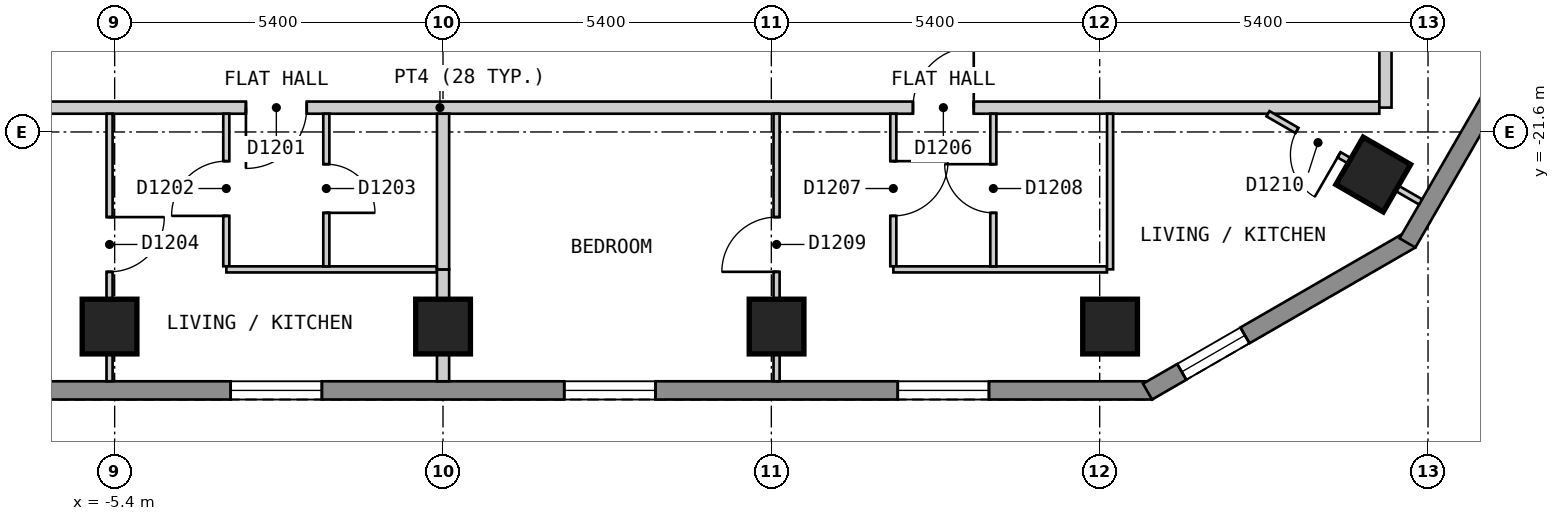
"""IFC4 building model, lengths in metres.
Left out: names, types, materials, properties, quantities, classifications, styles, units other than length and angle.
Written with IfcOpenShell. Run it as: python <this file> out.ifc"""

import sys

from ifc_helpers import new_model, si_unit, direction, frame, frame_2d, origin, origin_2d, place, context, subcontext, project, spatial, polyline, rectangle, outline, extrude, element, fill, save


model = new_model("IFC4")
c1 = context("Model", 3, precision=1e-05, world=origin(), true_north=direction((0.0, 1.0)))
c2 = subcontext(c1, "Body", "Model", "MODEL_VIEW")
j1 = project(units=[si_unit("LENGTHUNIT", "METRE"), si_unit("PLANEANGLEUNIT", "RADIAN")], contexts=[c1])
p1 = place(None, origin())
s1 = spatial("IfcSite", under=j1, at=p1, CompositionType="ELEMENT")
p2 = place(p1, origin())
s2 = spatial("IfcBuilding", under=s1, at=p2, CompositionType="ELEMENT")
p3 = place(p2, frame((0.0, 0.0, 129.6)))
s3 = spatial("IfcBuildingStorey", under=s2, at=p3, CompositionType="ELEMENT", Elevation=129.6)
for number, where, z_axis, x_axis in (
    (1, (-5.484, -24.8, 0.0), (0.0, 0.0, 1.0), (1.0, 0.0, 0.0)),
    (2, (0.001, -24.8, 0.0), (0.0, 0.0, 1.0), (1.0, 0.0, 0.0)),
    (3, (5.486, -24.8, 0.0), (0.0, 0.0, 1.0), (1.0, 0.0, 0.0)),
    (4, (10.971, -24.8, 0.0), (0.0, 0.0, 1.0), (1.0, 0.0, 0.0)),
    (5, (15.299, -22.3, 0.0), (0.0, 0.0, 1.0), (0.5, 0.866, 0.0)),
):
    element("IfcColumn", number, at=place(p3, frame(where, z_axis=z_axis, x_axis=x_axis)), inside=s3, PredefinedType="COLUMN", context=c2, shape_type="SweptSolid", body=[
        extrude(rectangle(XDim=0.9, YDim=0.9, at=origin_2d()), origin(), (0.0, 0.0, 1.0), 3.0),
    ])
p4 = place(p3, frame((-11.662, -25.85, 0.0), z_axis=(0.0, 0.0, 1.0), x_axis=(1.0, 0.0, 0.0)))
e6 = element("IfcWall", 6, at=p4, inside=s3, PredefinedType="SOLIDWALL", context=c2, shape_type="SweptSolid", body=[
    extrude(outline(polyline([(0.0, -0.15), (23.324, -0.15), (23.244, 0.15), (0.08, 0.15), (0.0, -0.15)])), origin(), (0.0, 0.0, 1.0), 2.7),
])
p5 = place(p4, frame((2.686, 0.0, 0.15)))
e7 = element("IfcOpeningElement", 7, at=p5, cuts=e6, PredefinedType="OPENING", context=c2, shape_type="SweptSolid", body=[
    extrude(rectangle(XDim=1.5, YDim=2.1, at=frame_2d((0.75, 1.05))), frame((0.0, 0.16, 0.0), z_axis=(0.0, -1.0, 0.0), x_axis=(1.0, 0.0, 0.0)), (0.0, 0.0, 1.0), 0.32),
])
p6 = place(p4, frame((8.17, 0.0, 0.15)))
e8 = element("IfcOpeningElement", 8, at=p6, cuts=e6, PredefinedType="OPENING", context=c2, shape_type="SweptSolid", body=[
    extrude(rectangle(XDim=1.5, YDim=2.1, at=frame_2d((0.75, 1.05))), frame((0.0, 0.16, 0.0), z_axis=(0.0, -1.0, 0.0), x_axis=(1.0, 0.0, 0.0)), (0.0, 0.0, 1.0), 0.32),
])
p7 = place(p4, frame((13.656, 0.0, 0.15)))
e9 = element("IfcOpeningElement", 9, at=p7, cuts=e6, PredefinedType="OPENING", context=c2, shape_type="SweptSolid", body=[
    extrude(rectangle(XDim=1.5, YDim=2.1, at=frame_2d((0.75, 1.05))), frame((0.0, 0.16, 0.0), z_axis=(0.0, -1.0, 0.0), x_axis=(1.0, 0.0, 0.0)), (0.0, 0.0, 1.0), 0.32),
])
p8 = place(p4, frame((19.141, 0.0, 0.15)))
e10 = element("IfcOpeningElement", 10, at=p8, cuts=e6, PredefinedType="OPENING", context=c2, shape_type="SweptSolid", body=[
    extrude(rectangle(XDim=1.5, YDim=2.1, at=frame_2d((0.75, 1.05))), frame((0.0, 0.16, 0.0), z_axis=(0.0, -1.0, 0.0), x_axis=(1.0, 0.0, 0.0)), (0.0, 0.0, 1.0), 0.32),
])
p9 = place(p3, frame((11.587, -25.87, 0.0), z_axis=(0.0, 0.0, 1.0), x_axis=(0.866022959057, 0.500004234368, 0.0)))
e11 = element("IfcWall", 11, at=p9, inside=s3, PredefinedType="SOLIDWALL", context=c2, shape_type="SweptSolid", body=[
    extrude(outline(polyline([(0.0, -0.15), (5.0, -0.15), (4.92, 0.15), (0.08, 0.15), (0.0, -0.15)])), origin(), (0.0, 0.0, 1.0), 2.7),
])
p10 = place(p9, frame((0.65, 0.0, 0.15)))
e12 = element("IfcOpeningElement", 12, at=p10, cuts=e11, PredefinedType="OPENING", context=c2, shape_type="SweptSolid", body=[
    extrude(rectangle(XDim=1.2, YDim=2.1, at=frame_2d((0.6, 1.05))), frame((0.0, 0.16, 0.0), z_axis=(0.0, -1.0, 0.0), x_axis=(1.0, 0.0, 0.0)), (0.0, 0.0, 1.0), 0.32),
])
p11 = place(p3, frame((15.862, -23.425, 0.0), z_axis=(0.0, 0.0, 1.0), x_axis=(0.500017503135, 0.866015298109, 0.0)))
e13 = element("IfcWall", 13, at=p11, inside=s3, PredefinedType="SOLIDWALL", context=c2, shape_type="SweptSolid", body=[
    extrude(outline(polyline([(0.0, -0.15), (24.711, -0.15), (24.631, 0.15), (0.08, 0.15), (0.0, -0.15)])), origin(), (0.0, 0.0, 1.0), 2.7),
])
p12 = place(p11, frame((2.857, 0.0, 0.15)))
e14 = element("IfcOpeningElement", 14, at=p12, cuts=e13, PredefinedType="OPENING", context=c2, shape_type="SweptSolid", body=[
    extrude(rectangle(XDim=1.5, YDim=2.1, at=frame_2d((0.75, 1.05))), frame((0.0, 0.16, 0.0), z_axis=(0.0, -1.0, 0.0), x_axis=(1.0, 0.0, 0.0)), (0.0, 0.0, 1.0), 0.32),
])
p13 = place(p11, frame((8.689, 0.0, 0.15)))
e15 = element("IfcOpeningElement", 15, at=p13, cuts=e13, PredefinedType="OPENING", context=c2, shape_type="SweptSolid", body=[
    extrude(rectangle(XDim=1.5, YDim=2.1, at=frame_2d((0.75, 1.05))), frame((0.0, 0.16, 0.0), z_axis=(0.0, -1.0, 0.0), x_axis=(1.0, 0.0, 0.0)), (0.0, 0.0, 1.0), 0.32),
])
p14 = place(p11, frame((14.52, 0.0, 0.15)))
e16 = element("IfcOpeningElement", 16, at=p14, cuts=e13, PredefinedType="OPENING", context=c2, shape_type="SweptSolid", body=[
    extrude(rectangle(XDim=1.5, YDim=2.1, at=frame_2d((0.75, 1.05))), frame((0.0, 0.16, 0.0), z_axis=(0.0, -1.0, 0.0), x_axis=(1.0, 0.0, 0.0)), (0.0, 0.0, 1.0), 0.32),
])
p15 = place(p11, frame((20.351, 0.0, 0.15)))
e17 = element("IfcOpeningElement", 17, at=p15, cuts=e13, PredefinedType="OPENING", context=c2, shape_type="SweptSolid", body=[
    extrude(rectangle(XDim=1.5, YDim=2.1, at=frame_2d((0.75, 1.05))), frame((0.0, 0.16, 0.0), z_axis=(0.0, -1.0, 0.0), x_axis=(1.0, 0.0, 0.0)), (0.0, 0.0, 1.0), 0.32),
])
p16 = place(p3, frame((-15.499, -21.2, 0.0), z_axis=(0.0, 0.0, 1.0), x_axis=(1.0, 0.0, 0.0)))
e18 = element("IfcWall", 18, at=p16, inside=s3, PredefinedType="PARTITIONING", context=c2, shape_type="SweptSolid", body=[
    extrude(rectangle(XDim=30.898, YDim=0.2, at=frame_2d((15.449, 0.0))), origin(), (0.0, 0.0, 1.0), 2.7),
])
p17 = place(p16, frame((12.258, 0.0, 0.0)))
e19 = element("IfcOpeningElement", 19, at=p17, cuts=e18, PredefinedType="OPENING", context=c2, shape_type="SweptSolid", body=[
    extrude(rectangle(XDim=1.0, YDim=2.1, at=frame_2d((0.5, 1.05))), frame((0.0, 0.11, 0.0), z_axis=(0.0, -1.0, 0.0), x_axis=(1.0, 0.0, 0.0)), (0.0, 0.0, 1.0), 0.22),
])
p18 = place(p16, frame((23.228, 0.0, 0.0)))
e20 = element("IfcOpeningElement", 20, at=p18, cuts=e18, PredefinedType="OPENING", context=c2, shape_type="SweptSolid", body=[
    extrude(rectangle(XDim=1.0, YDim=2.1, at=frame_2d((0.5, 1.05))), frame((0.0, 0.11, 0.0), z_axis=(0.0, -1.0, 0.0), x_axis=(1.0, 0.0, 0.0)), (0.0, 0.0, 1.0), 0.22),
])
p19 = place(p3, frame((15.5, -21.199, 0.0), z_axis=(0.0, 0.0, 1.0), x_axis=(0.0, 1.0, 0.0)))
e21 = element("IfcWall", 21, at=p19, inside=s3, PredefinedType="PARTITIONING", context=c2, shape_type="SweptSolid", body=[
    extrude(rectangle(XDim=17.647, YDim=0.2, at=frame_2d((8.823, 0.0))), origin(), (0.0, 0.0, 1.0), 2.7),
])
p20 = place(p19, frame((14.934, 0.0, 0.0)))
e22 = element("IfcOpeningElement", 22, at=p20, cuts=e21, PredefinedType="OPENING", context=c2, shape_type="SweptSolid", body=[
    extrude(rectangle(XDim=1.0, YDim=2.1, at=frame_2d((0.5, 1.05))), frame((0.0, 0.11, 0.0), z_axis=(0.0, -1.0, 0.0), x_axis=(1.0, 0.0, 0.0)), (0.0, 0.0, 1.0), 0.22),
])
p21 = place(p3, frame((-3.564, -21.3, 0.0), z_axis=(0.0, 0.0, 1.0), x_axis=(0.0, -1.0, 0.0)))
e23 = element("IfcWall", 23, at=p21, inside=s3, PredefinedType="PARTITIONING", context=c2, shape_type="SweptSolid", body=[
    extrude(rectangle(XDim=2.509, YDim=0.1, at=frame_2d((1.254, 0.0))), origin(), (0.0, 0.0, 1.0), 2.7),
])
p22 = place(p21, frame((0.78, 0.0, 0.0)))
e24 = element("IfcOpeningElement", 24, at=p22, cuts=e23, PredefinedType="OPENING", context=c2, shape_type="SweptSolid", body=[
    extrude(rectangle(XDim=0.9, YDim=2.1, at=frame_2d((0.45, 1.05))), frame((0.0, 0.06, 0.0), z_axis=(0.0, -1.0, 0.0), x_axis=(1.0, 0.0, 0.0)), (0.0, 0.0, 1.0), 0.12),
])
p23 = place(p3, frame((7.406, -21.3, 0.0), z_axis=(0.0, 0.0, 1.0), x_axis=(0.0, -1.0, 0.0)))
e25 = element("IfcWall", 25, at=p23, inside=s3, PredefinedType="PARTITIONING", context=c2, shape_type="SweptSolid", body=[
    extrude(rectangle(XDim=2.509, YDim=0.1, at=frame_2d((1.254, 0.0))), origin(), (0.0, 0.0, 1.0), 2.7),
])
p24 = place(p23, frame((0.78, 0.0, 0.0)))
e26 = element("IfcOpeningElement", 26, at=p24, cuts=e25, PredefinedType="OPENING", context=c2, shape_type="SweptSolid", body=[
    extrude(rectangle(XDim=0.9, YDim=2.1, at=frame_2d((0.45, 1.05))), frame((0.0, 0.06, 0.0), z_axis=(0.0, -1.0, 0.0), x_axis=(1.0, 0.0, 0.0)), (0.0, 0.0, 1.0), 0.12),
])
p25 = place(p3, frame((13.568, -21.3, 0.0), z_axis=(0.0, 0.0, 1.0), x_axis=(0.865885342641, -0.500242514586, 0.0)))
e27 = element("IfcWall", 27, at=p25, inside=s3, PredefinedType="PARTITIONING", context=c2, shape_type="SweptSolid", body=[
    extrude(rectangle(XDim=2.898, YDim=0.1, at=frame_2d((1.449, 0.0))), origin(), (0.0, 0.0, 1.0), 2.7),
])
p26 = place(p25, frame((0.55, 0.0, 0.0)))
e28 = element("IfcOpeningElement", 28, at=p26, cuts=e27, PredefinedType="OPENING", context=c2, shape_type="SweptSolid", body=[
    extrude(rectangle(XDim=0.8, YDim=2.1, at=frame_2d((0.4, 1.05))), frame((0.0, 0.06, 0.0), z_axis=(0.0, -1.0, 0.0), x_axis=(1.0, 0.0, 0.0)), (0.0, 0.0, 1.0), 0.12),
])
p27 = place(p3, frame((-3.563, -23.86, 0.0), z_axis=(0.0, 0.0, 1.0), x_axis=(1.0, 0.0, 0.0)))
e29 = element("IfcWall", 29, at=p27, inside=s3, PredefinedType="PARTITIONING", context=c2, shape_type="SweptSolid", body=[
    extrude(rectangle(XDim=3.464, YDim=0.1, at=frame_2d((1.732, 0.0))), origin(), (0.0, 0.0, 1.0), 2.7),
])
p28 = place(p3, frame((7.407, -23.86, 0.0), z_axis=(0.0, 0.0, 1.0), x_axis=(1.0, 0.0, 0.0)))
e30 = element("IfcWall", 30, at=p28, inside=s3, PredefinedType="PARTITIONING", context=c2, shape_type="SweptSolid", body=[
    extrude(rectangle(XDim=3.513, YDim=0.1, at=frame_2d((1.756, 0.0))), origin(), (0.0, 0.0, 1.0), 2.7),
])
p29 = place(p3, frame((5.486, -25.7, 0.0), z_axis=(0.0, 0.0, 1.0), x_axis=(0.0, 1.0, 0.0)))
e31 = element("IfcWall", 31, at=p29, inside=s3, PredefinedType="PARTITIONING", context=c2, shape_type="SweptSolid", body=[
    extrude(rectangle(XDim=4.4, YDim=0.1, at=frame_2d((2.2, 0.0))), origin(), (0.0, 0.0, 1.0), 2.7),
])
p30 = place(p29, frame((1.8, 0.0, 0.0)))
e32 = element("IfcOpeningElement", 32, at=p30, cuts=e31, PredefinedType="OPENING", context=c2, shape_type="SweptSolid", body=[
    extrude(rectangle(XDim=0.9, YDim=2.1, at=frame_2d((0.45, 1.05))), frame((0.0, 0.06, 0.0), z_axis=(0.0, -1.0, 0.0), x_axis=(1.0, 0.0, 0.0)), (0.0, 0.0, 1.0), 0.12),
])
p31 = place(p3, frame((9.051, -23.81, 0.0), z_axis=(0.0, 0.0, 1.0), x_axis=(0.0, 1.0, 0.0)))
e33 = element("IfcWall", 33, at=p31, inside=s3, PredefinedType="PARTITIONING", context=c2, shape_type="SweptSolid", body=[
    extrude(rectangle(XDim=2.51, YDim=0.1, at=frame_2d((1.255, 0.0))), origin(), (0.0, 0.0, 1.0), 2.7),
])
p32 = place(p31, frame((0.88, 0.0, 0.0)))
e34 = element("IfcOpeningElement", 34, at=p32, cuts=e33, PredefinedType="OPENING", context=c2, shape_type="SweptSolid", body=[
    extrude(rectangle(XDim=0.8, YDim=2.1, at=frame_2d((0.4, 1.05))), frame((0.0, 0.06, 0.0), z_axis=(0.0, -1.0, 0.0), x_axis=(1.0, 0.0, 0.0)), (0.0, 0.0, 1.0), 0.12),
])
p33 = place(p3, frame((10.971, -23.859, 0.0), z_axis=(0.0, 0.0, 1.0), x_axis=(0.0, 1.0, 0.0)))
e35 = element("IfcWall", 35, at=p33, inside=s3, PredefinedType="PARTITIONING", context=c2, shape_type="SweptSolid", body=[
    extrude(rectangle(XDim=2.559, YDim=0.1, at=frame_2d((1.279, 0.0))), origin(), (0.0, 0.0, 1.0), 2.7),
])
p34 = place(p3, frame((-5.484, -25.7, 0.0), z_axis=(0.0, 0.0, 1.0), x_axis=(0.0, 1.0, 0.0)))
e36 = element("IfcWall", 36, at=p34, inside=s3, PredefinedType="PARTITIONING", context=c2, shape_type="SweptSolid", body=[
    extrude(rectangle(XDim=4.4, YDim=0.1, at=frame_2d((2.2, 0.0))), origin(), (0.0, 0.0, 1.0), 2.7),
])
p35 = place(p34, frame((1.8, 0.0, 0.0)))
e37 = element("IfcOpeningElement", 37, at=p35, cuts=e36, PredefinedType="OPENING", context=c2, shape_type="SweptSolid", body=[
    extrude(rectangle(XDim=0.9, YDim=2.1, at=frame_2d((0.45, 1.05))), frame((0.0, 0.06, 0.0), z_axis=(0.0, -1.0, 0.0), x_axis=(1.0, 0.0, 0.0)), (0.0, 0.0, 1.0), 0.12),
])
p36 = place(p3, frame((-1.919, -23.81, 0.0), z_axis=(0.0, 0.0, 1.0), x_axis=(0.0, 1.0, 0.0)))
e38 = element("IfcWall", 38, at=p36, inside=s3, PredefinedType="PARTITIONING", context=c2, shape_type="SweptSolid", body=[
    extrude(rectangle(XDim=2.51, YDim=0.1, at=frame_2d((1.255, 0.0))), origin(), (0.0, 0.0, 1.0), 2.7),
])
p37 = place(p36, frame((0.88, 0.0, 0.0)))
e39 = element("IfcOpeningElement", 39, at=p37, cuts=e38, PredefinedType="OPENING", context=c2, shape_type="SweptSolid", body=[
    extrude(rectangle(XDim=0.8, YDim=2.1, at=frame_2d((0.4, 1.05))), frame((0.0, 0.06, 0.0), z_axis=(0.0, -1.0, 0.0), x_axis=(1.0, 0.0, 0.0)), (0.0, 0.0, 1.0), 0.12),
])
p38 = place(p3, frame((0.001, -23.86, 0.0), z_axis=(0.0, 0.0, 1.0), x_axis=(0.0, -1.0, 0.0)))
e40 = element("IfcWall", 40, at=p38, inside=s3, PredefinedType="PARTITIONING", context=c2, shape_type="SweptSolid", body=[
    extrude(rectangle(XDim=1.84, YDim=0.2, at=frame_2d((0.92, 0.0))), origin(), (0.0, 0.0, 1.0), 2.7),
])
p39 = place(p3, frame((0.001, -23.86, 0.0), z_axis=(0.0, 0.0, 1.0), x_axis=(0.0, 1.0, 0.0)))
e41 = element("IfcWall", 41, at=p39, inside=s3, PredefinedType="PARTITIONING", context=c2, shape_type="SweptSolid", body=[
    extrude(rectangle(XDim=2.56, YDim=0.2, at=frame_2d((1.28, 0.0))), origin(), (0.0, 0.0, 1.0), 2.7),
])
p40 = place(p6, origin())
e42 = element("IfcWindow", 42, at=p40, inside=s3, PartitioningType="SINGLE_PANEL", PredefinedType="WINDOW", context=c2, shape_type="SweptSolid", body=[
    extrude(rectangle(XDim=1.5, YDim=2.1, at=frame_2d((0.75, 1.05))), frame((0.0, 0.03, 0.0), z_axis=(0.0, -1.0, 0.0), x_axis=(1.0, 0.0, 0.0)), (0.0, 0.0, 1.0), 0.06),
])
fill(e8, e42)
p41 = place(p7, origin())
e43 = element("IfcWindow", 43, at=p41, inside=s3, PartitioningType="SINGLE_PANEL", PredefinedType="WINDOW", context=c2, shape_type="SweptSolid", body=[
    extrude(rectangle(XDim=1.5, YDim=2.1, at=frame_2d((0.75, 1.05))), frame((0.0, 0.03, 0.0), z_axis=(0.0, -1.0, 0.0), x_axis=(1.0, 0.0, 0.0)), (0.0, 0.0, 1.0), 0.06),
])
fill(e9, e43)
p42 = place(p8, origin())
e44 = element("IfcWindow", 44, at=p42, inside=s3, PartitioningType="SINGLE_PANEL", PredefinedType="WINDOW", context=c2, shape_type="SweptSolid", body=[
    extrude(rectangle(XDim=1.5, YDim=2.1, at=frame_2d((0.75, 1.05))), frame((0.0, 0.03, 0.0), z_axis=(0.0, -1.0, 0.0), x_axis=(1.0, 0.0, 0.0)), (0.0, 0.0, 1.0), 0.06),
])
fill(e10, e44)
p43 = place(p10, origin())
e45 = element("IfcWindow", 45, at=p43, inside=s3, PartitioningType="SINGLE_PANEL", PredefinedType="WINDOW", context=c2, shape_type="SweptSolid", body=[
    extrude(rectangle(XDim=1.2, YDim=2.1, at=frame_2d((0.6, 1.05))), frame((0.0, 0.03, 0.0), z_axis=(0.0, -1.0, 0.0), x_axis=(1.0, 0.0, 0.0)), (0.0, 0.0, 1.0), 0.06),
])
fill(e12, e45)
p44 = place(p17, origin())
e46 = element("IfcDoor", 46, at=p44, inside=s3, OperationType="SINGLE_SWING_LEFT", PredefinedType="DOOR", context=c2, shape_type="SweptSolid", body=[
    extrude(rectangle(XDim=1.0, YDim=2.1, at=frame_2d((0.5, 1.05))), frame((0.0, 0.025, 0.0), z_axis=(0.0, -1.0, 0.0), x_axis=(1.0, 0.0, 0.0)), (0.0, 0.0, 1.0), 0.05),
])
fill(e19, e46)
p45 = place(p22, origin())
e47 = element("IfcDoor", 47, at=p45, inside=s3, OperationType="SINGLE_SWING_RIGHT", PredefinedType="DOOR", context=c2, shape_type="SweptSolid", body=[
    extrude(rectangle(XDim=0.9, YDim=2.1, at=frame_2d((0.45, 1.05))), frame((0.0, 0.025, 0.0), z_axis=(0.0, -1.0, 0.0), x_axis=(1.0, 0.0, 0.0)), (0.0, 0.0, 1.0), 0.05),
])
fill(e24, e47)
p46 = place(p37, origin())
e48 = element("IfcDoor", 48, at=p46, inside=s3, OperationType="SINGLE_SWING_LEFT", PredefinedType="DOOR", context=c2, shape_type="SweptSolid", body=[
    extrude(rectangle(XDim=0.8, YDim=2.1, at=frame_2d((0.4, 1.05))), frame((0.0, 0.025, 0.0), z_axis=(0.0, -1.0, 0.0), x_axis=(1.0, 0.0, 0.0)), (0.0, 0.0, 1.0), 0.05),
])
fill(e39, e48)
p47 = place(p35, origin())
e49 = element("IfcDoor", 49, at=p47, inside=s3, OperationType="SINGLE_SWING_RIGHT", PredefinedType="DOOR", context=c2, shape_type="SweptSolid", body=[
    extrude(rectangle(XDim=0.9, YDim=2.1, at=frame_2d((0.45, 1.05))), frame((0.0, 0.025, 0.0), z_axis=(0.0, -1.0, 0.0), x_axis=(1.0, 0.0, 0.0)), (0.0, 0.0, 1.0), 0.05),
])
fill(e37, e49)
p48 = place(p18, origin())
e50 = element("IfcDoor", 50, at=p48, inside=s3, OperationType="SINGLE_SWING_RIGHT", PredefinedType="DOOR", context=c2, shape_type="SweptSolid", body=[
    extrude(rectangle(XDim=1.0, YDim=2.1, at=frame_2d((0.5, 1.05))), frame((0.0, 0.025, 0.0), z_axis=(0.0, -1.0, 0.0), x_axis=(1.0, 0.0, 0.0)), (0.0, 0.0, 1.0), 0.05),
])
fill(e20, e50)
p49 = place(p24, origin())
e51 = element("IfcDoor", 51, at=p49, inside=s3, OperationType="SINGLE_SWING_LEFT", PredefinedType="DOOR", context=c2, shape_type="SweptSolid", body=[
    extrude(rectangle(XDim=0.9, YDim=2.1, at=frame_2d((0.45, 1.05))), frame((0.0, 0.025, 0.0), z_axis=(0.0, -1.0, 0.0), x_axis=(1.0, 0.0, 0.0)), (0.0, 0.0, 1.0), 0.05),
])
fill(e26, e51)
p50 = place(p32, origin())
e52 = element("IfcDoor", 52, at=p50, inside=s3, OperationType="SINGLE_SWING_RIGHT", PredefinedType="DOOR", context=c2, shape_type="SweptSolid", body=[
    extrude(rectangle(XDim=0.8, YDim=2.1, at=frame_2d((0.4, 1.05))), frame((0.0, 0.025, 0.0), z_axis=(0.0, -1.0, 0.0), x_axis=(1.0, 0.0, 0.0)), (0.0, 0.0, 1.0), 0.05),
])
fill(e34, e52)
p51 = place(p30, origin())
e53 = element("IfcDoor", 53, at=p51, inside=s3, OperationType="SINGLE_SWING_LEFT", PredefinedType="DOOR", context=c2, shape_type="SweptSolid", body=[
    extrude(rectangle(XDim=0.9, YDim=2.1, at=frame_2d((0.45, 1.05))), frame((0.0, 0.025, 0.0), z_axis=(0.0, -1.0, 0.0), x_axis=(1.0, 0.0, 0.0)), (0.0, 0.0, 1.0), 0.05),
])
fill(e32, e53)
p52 = place(p26, origin())
e54 = element("IfcDoor", 54, at=p52, inside=s3, OperationType="SINGLE_SWING_RIGHT", PredefinedType="DOOR", context=c2, shape_type="SweptSolid", body=[
    extrude(rectangle(XDim=0.8, YDim=2.1, at=frame_2d((0.4, 1.05))), frame((0.0, 0.025, 0.0), z_axis=(0.0, -1.0, 0.0), x_axis=(1.0, 0.0, 0.0)), (0.0, 0.0, 1.0), 0.05),
])
fill(e28, e54)
save(model, sys.argv[1])
